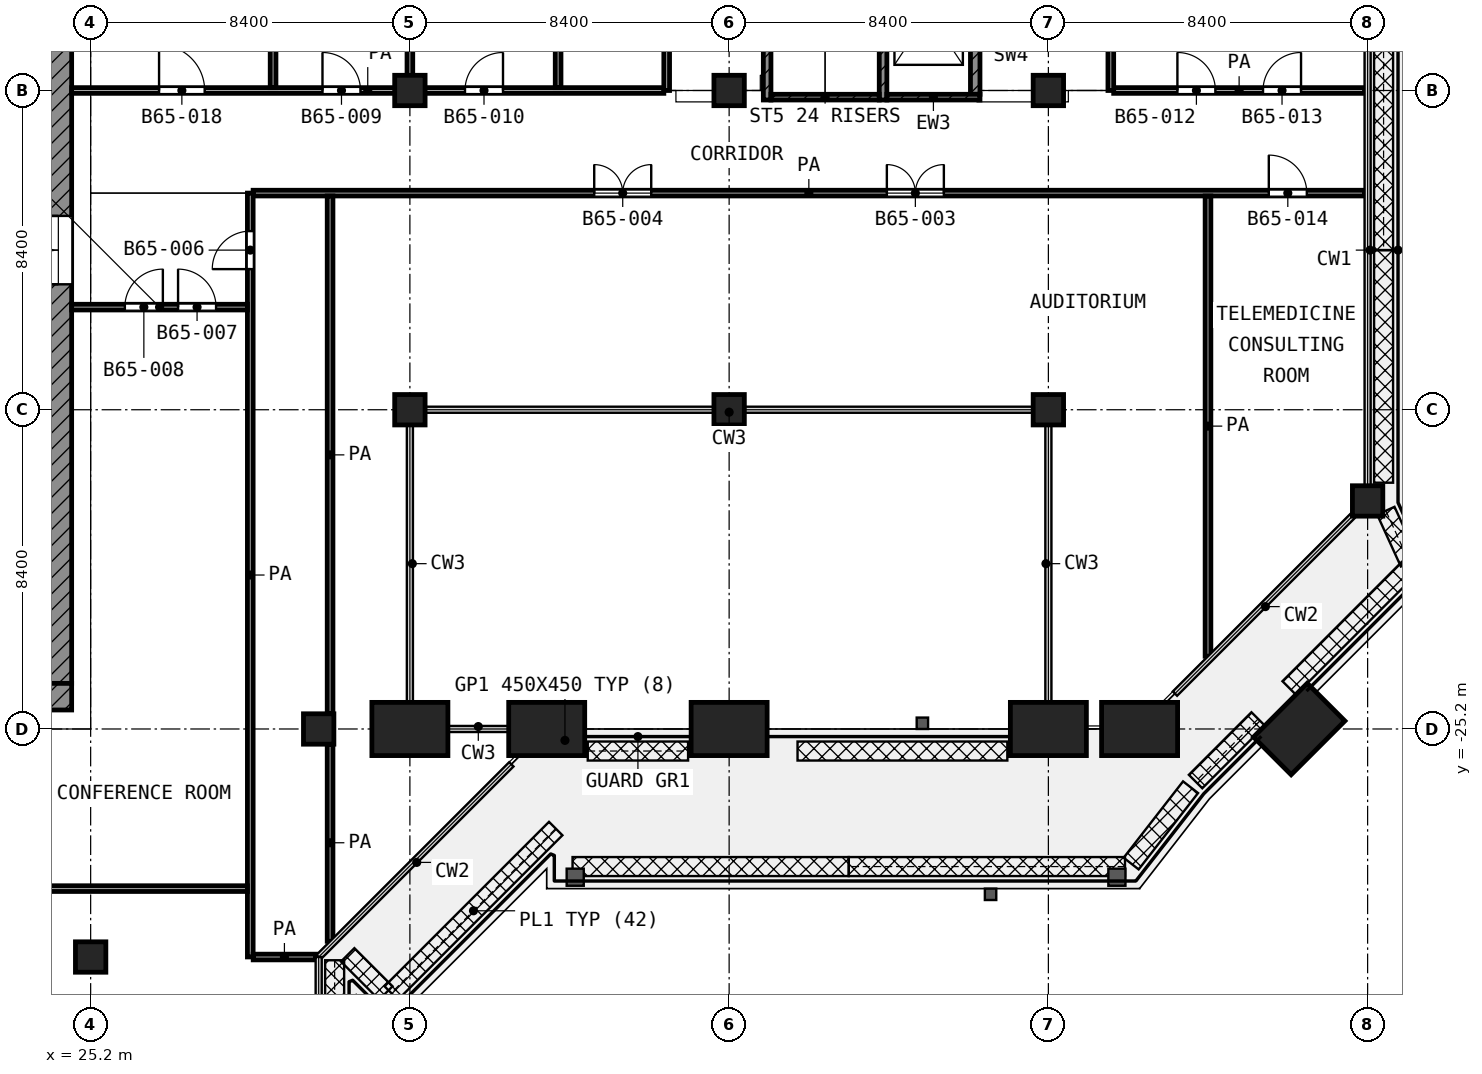
"""IFC4 building model, lengths in metres.
Left out: names, types, materials, properties, quantities, classifications, styles, units other than length and angle.
Written with IfcOpenShell. Run it as: python <this file> out.ifc"""

import sys

from ifc_helpers import new_model, si_unit, direction, frame, frame_2d, origin, origin_2d, place, context, subcontext, project, spatial, rectangle, extrude, element, fill, save


model = new_model("IFC4")
c1 = context("Model", 3, precision=1e-05, world=origin(), true_north=direction((0.0, 1.0)))
c2 = subcontext(c1, "Body", "Model", "MODEL_VIEW")
j1 = project(units=[si_unit("LENGTHUNIT", "METRE"), si_unit("PLANEANGLEUNIT", "RADIAN")], contexts=[c1])
p1 = place(None, origin())
s1 = spatial("IfcSite", under=j1, at=p1, CompositionType="ELEMENT")
p2 = place(p1, origin())
s2 = spatial("IfcBuilding", under=s1, at=p2, CompositionType="ELEMENT")
p3 = place(p2, frame((0.0, 0.0, 281.8)))
s3 = spatial("IfcBuildingStorey", under=s2, at=p3, CompositionType="ELEMENT", Elevation=281.8)
for number, where, z_axis, x_axis in (
    (1, (33.6, -8.4, 0.0), (0.0, 0.0, 1.0), (1.0, 0.0, 0.0)),
    (2, (42.0, -8.4, 0.0), (0.0, 0.0, 1.0), (1.0, 0.0, 0.0)),
    (3, (50.4, -8.4, 0.0), (0.0, 0.0, 1.0), (1.0, 0.0, 0.0)),
    (4, (33.6, -16.8, 0.0), (0.0, 0.0, 1.0), (1.0, 0.0, 0.0)),
    (5, (42.0, -16.8, 0.0), (0.0, 0.0, 1.0), (1.0, 0.0, 0.0)),
    (6, (50.4, -16.8, 0.0), (0.0, 0.0, 1.0), (1.0, 0.0, 0.0)),
    (7, (58.8, -19.2, 0.0), (0.0, 0.0, 1.0), (1.0, 0.0, 0.0)),
    (8, (31.2, -25.2, 0.0), (0.0, 0.0, 1.0), (1.0, 0.0, 0.0)),
):
    element("IfcColumn", number, at=place(p3, frame(where, z_axis=z_axis, x_axis=x_axis)), inside=s3, PredefinedType="COLUMN", context=c2, shape_type="SweptSolid", body=[
        extrude(rectangle(XDim=0.8, YDim=0.8, at=origin_2d()), origin(), (0.0, 0.0, 1.0), 4.2),
    ])
for number, where, z_axis, x_axis in (
    (9, (42.0, -25.2, 0.0), (0.0, 0.0, 1.0), (-1.0, 0.0, 0.0)),
    (10, (52.8, -25.2, 0.0), (0.0, 0.0, 1.0), (-1.0, 0.0, 0.0)),
):
    element("IfcColumn", number, at=place(p3, frame(where, z_axis=z_axis, x_axis=x_axis)), inside=s3, PredefinedType="COLUMN", context=c2, shape_type="SweptSolid", body=[
        extrude(rectangle(XDim=2.0, YDim=1.4, at=origin_2d()), origin(), (0.0, 0.0, 1.0), 4.2),
    ])
p4 = place(p3, frame((25.2, -31.2, 0.0), z_axis=(0.0, 0.0, 1.0), x_axis=(1.0, 0.0, 0.0)))
e11 = element("IfcColumn", 11, at=p4, inside=s3, PredefinedType="COLUMN", context=c2, shape_type="SweptSolid", body=[
    extrude(rectangle(XDim=0.8, YDim=0.8, at=origin_2d()), origin(), (0.0, 0.0, 1.0), 4.2),
])
for number, where, z_axis, x_axis in (
    (12, (50.4, -25.2, 0.0), (0.0, 0.0, 1.0), (-1.0, 0.0, 0.0)),
    (13, (37.2, -25.2, 0.0), (0.0, 0.0, 1.0), (-1.0, 0.0, 0.0)),
    (14, (33.6, -25.2, 0.0), (0.0, 0.0, 1.0), (-1.0, 0.0, 0.0)),
    (15, (57.0, -25.2, 0.0), (0.0, 0.0, 1.0), (-0.707, -0.707, 0.0)),
):
    element("IfcColumn", number, at=place(p3, frame(where, z_axis=z_axis, x_axis=x_axis)), inside=s3, PredefinedType="COLUMN", context=c2, shape_type="SweptSolid", body=[
        extrude(rectangle(XDim=2.0, YDim=1.4, at=origin_2d()), origin(), (0.0, 0.0, 1.0), 4.2),
    ])
p5 = place(p3, frame((24.35, -24.0, 0.0), z_axis=(0.0, 0.0, 1.0), x_axis=(0.0, 1.0, 0.0)))
e16 = element("IfcWall", 16, at=p5, inside=s3, PredefinedType="SHEAR", context=c2, shape_type="SweptSolid", body=[
    extrude(rectangle(XDim=18.6, YDim=0.7, at=frame_2d((9.3, 0.0))), origin(), (0.0, 0.0, 1.0), 3.6),
])
p6 = place(p5, frame((10.5, 0.0, 0.0)))
e17 = element("IfcOpeningElement", 17, at=p6, cuts=e16, PredefinedType="OPENING", context=c2, shape_type="SweptSolid", body=[
    extrude(rectangle(XDim=1.8, YDim=2.1, at=frame_2d((0.9, 1.05))), frame((0.0, 0.36, 0.0), z_axis=(0.0, -1.0, 0.0), x_axis=(1.0, 0.0, 0.0)), (0.0, 0.0, 1.0), 0.72),
])
p7 = place(p3, frame((24.35, -24.7, 0.0), z_axis=(0.0, 0.0, 1.0), x_axis=(0.0, 1.0, 0.0)))
e18 = element("IfcWall", 18, at=p7, inside=s3, PredefinedType="SHEAR", context=c2, shape_type="SweptSolid", body=[
    extrude(rectangle(XDim=0.7, YDim=0.7, at=frame_2d((0.35, 0.0))), origin(), (0.0, 0.0, 1.0), 3.6),
])
p8 = place(p3, frame((43.0, -8.65, 0.0), z_axis=(0.0, 0.0, 1.0), x_axis=(0.0, 1.0, 0.0)))
e19 = element("IfcWall", 19, at=p8, inside=s3, PredefinedType="SHEAR", context=c2, shape_type="SweptSolid", body=[
    extrude(rectangle(XDim=8.35, YDim=0.2, at=frame_2d((4.175, 0.0))), origin(), (0.0, 0.0, 1.0), 3.6),
])
p9 = place(p8, frame((7.0, 0.0, 0.0)))
e20 = element("IfcOpeningElement", 20, at=p9, cuts=e19, PredefinedType="OPENING", context=c2, shape_type="SweptSolid", body=[
    extrude(rectangle(XDim=1.1, YDim=2.1, at=frame_2d((0.55, 1.05))), frame((0.0, 0.11, 0.0), z_axis=(0.0, -1.0, 0.0), x_axis=(1.0, 0.0, 0.0)), (0.0, 0.0, 1.0), 0.22),
])
p10 = place(p3, frame((46.05, -8.65, 0.0), z_axis=(0.0, 0.0, 1.0), x_axis=(0.0, 1.0, 0.0)))
e21 = element("IfcWall", 21, at=p10, inside=s3, PredefinedType="SHEAR", context=c2, shape_type="SweptSolid", body=[
    extrude(rectangle(XDim=8.35, YDim=0.2, at=frame_2d((4.175, 0.0))), origin(), (0.0, 0.0, 1.0), 3.6),
])
p11 = place(p10, frame((7.0, 0.0, 0.0)))
e22 = element("IfcOpeningElement", 22, at=p11, cuts=e21, PredefinedType="OPENING", context=c2, shape_type="SweptSolid", body=[
    extrude(rectangle(XDim=1.1, YDim=2.1, at=frame_2d((0.55, 1.05))), frame((0.0, 0.11, 0.0), z_axis=(0.0, -1.0, 0.0), x_axis=(1.0, 0.0, 0.0)), (0.0, 0.0, 1.0), 0.22),
])
p12 = place(p3, frame((43.1, -8.575, 0.0), z_axis=(0.0, 0.0, 1.0), x_axis=(1.0, 0.0, 0.0)))
e23 = element("IfcWall", 23, at=p12, inside=s3, PredefinedType="SHEAR", context=c2, shape_type="SweptSolid", body=[
    extrude(rectangle(XDim=2.85, YDim=0.15, at=frame_2d((1.425, 0.0))), origin(), (0.0, 0.0, 1.0), 3.6),
])
p13 = place(p3, frame((46.15, -8.575, 0.0), z_axis=(0.0, 0.0, 1.0), x_axis=(1.0, 0.0, 0.0)))
e24 = element("IfcWall", 24, at=p13, inside=s3, PredefinedType="SHEAR", context=c2, shape_type="SweptSolid", body=[
    extrude(rectangle(XDim=2.45, YDim=0.15, at=frame_2d((1.225, 0.0))), origin(), (0.0, 0.0, 1.0), 3.6),
])
p14 = place(p3, frame((48.475, -8.5, 0.0), z_axis=(0.0, 0.0, 1.0), x_axis=(0.0, 1.0, 0.0)))
e25 = element("IfcWall", 25, at=p14, inside=s3, PredefinedType="SHEAR", context=c2, shape_type="SweptSolid", body=[
    extrude(rectangle(XDim=3.475, YDim=0.25, at=frame_2d((1.738, 0.0))), origin(), (0.0, 0.0, 1.0), 3.6),
])
p15 = place(p3, frame((29.477, -31.2, 0.0), z_axis=(0.0, 0.0, 1.0), x_axis=(1.0, 0.0, 0.0)))
e26 = element("IfcWall", 26, at=p15, inside=s3, PredefinedType="PARTITIONING", context=c2, shape_type="SweptSolid", body=[
    extrude(rectangle(XDim=1.643, YDim=0.15, at=frame_2d((0.822, 0.0))), origin(), (0.0, 0.0, 1.0), 3.6),
])
p16 = place(p3, frame((11.175, -29.4, 0.0), z_axis=(0.0, 0.0, 1.0), x_axis=(1.0, 0.0, 0.0)))
e27 = element("IfcWall", 27, at=p16, inside=s3, PredefinedType="PARTITIONING", context=c2, shape_type="SweptSolid", body=[
    extrude(rectangle(XDim=18.15, YDim=0.15, at=frame_2d((9.075, 0.0))), origin(), (0.0, 0.0, 1.0), 3.6),
])
p17 = place(p3, frame((24.7, -14.1, 0.0), z_axis=(0.0, 0.0, 1.0), x_axis=(1.0, 0.0, 0.0)))
e28 = element("IfcWall", 28, at=p17, inside=s3, PredefinedType="PARTITIONING", context=c2, shape_type="SweptSolid", body=[
    extrude(rectangle(XDim=4.625, YDim=0.15, at=frame_2d((2.312, 0.0))), origin(), (0.0, 0.0, 1.0), 3.6),
])
p18 = place(p17, frame((2.8, 0.0, 0.0)))
e29 = element("IfcOpeningElement", 29, at=p18, cuts=e28, PredefinedType="OPENING", context=c2, shape_type="SweptSolid", body=[
    extrude(rectangle(XDim=1.0, YDim=2.1, at=frame_2d((0.5, 1.05))), frame((0.0, 0.085, 0.0), z_axis=(0.0, -1.0, 0.0), x_axis=(1.0, 0.0, 0.0)), (0.0, 0.0, 1.0), 0.17),
])
p19 = place(p17, frame((1.4, 0.0, 0.0)))
e30 = element("IfcOpeningElement", 30, at=p19, cuts=e28, PredefinedType="OPENING", context=c2, shape_type="SweptSolid", body=[
    extrude(rectangle(XDim=1.0, YDim=2.1, at=frame_2d((0.5, 1.05))), frame((0.0, 0.085, 0.0), z_axis=(0.0, -1.0, 0.0), x_axis=(1.0, 0.0, 0.0)), (0.0, 0.0, 1.0), 0.17),
])
p20 = place(p3, frame((29.475, -11.1, 0.0), z_axis=(0.0, 0.0, 1.0), x_axis=(1.0, 0.0, 0.0)))
e31 = element("IfcWall", 31, at=p20, inside=s3, PredefinedType="PARTITIONING", context=c2, shape_type="SweptSolid", body=[
    extrude(rectangle(XDim=29.245, YDim=0.15, at=frame_2d((14.623, 0.0))), origin(), (0.0, 0.0, 1.0), 3.6),
])
p21 = place(p20, frame((26.725, 0.0, 0.0)))
e32 = element("IfcOpeningElement", 32, at=p21, cuts=e31, PredefinedType="OPENING", context=c2, shape_type="SweptSolid", body=[
    extrude(rectangle(XDim=1.0, YDim=2.1, at=frame_2d((0.5, 1.05))), frame((0.0, 0.085, 0.0), z_axis=(0.0, -1.0, 0.0), x_axis=(1.0, 0.0, 0.0)), (0.0, 0.0, 1.0), 0.17),
])
p22 = place(p20, frame((16.675, 0.0, 0.0)))
e33 = element("IfcOpeningElement", 33, at=p22, cuts=e31, PredefinedType="OPENING", context=c2, shape_type="SweptSolid", body=[
    extrude(rectangle(XDim=1.5, YDim=2.1, at=frame_2d((0.75, 1.05))), frame((0.0, 0.085, 0.0), z_axis=(0.0, -1.0, 0.0), x_axis=(1.0, 0.0, 0.0)), (0.0, 0.0, 1.0), 0.17),
])
p23 = place(p20, frame((8.975, 0.0, 0.0)))
e34 = element("IfcOpeningElement", 34, at=p23, cuts=e31, PredefinedType="OPENING", context=c2, shape_type="SweptSolid", body=[
    extrude(rectangle(XDim=1.5, YDim=2.1, at=frame_2d((0.75, 1.05))), frame((0.0, 0.085, 0.0), z_axis=(0.0, -1.0, 0.0), x_axis=(1.0, 0.0, 0.0)), (0.0, 0.0, 1.0), 0.17),
])
p24 = place(p3, frame((24.7, -8.4, 0.0), z_axis=(0.0, 0.0, 1.0), x_axis=(1.0, 0.0, 0.0)))
e35 = element("IfcWall", 35, at=p24, inside=s3, PredefinedType="PARTITIONING", context=c2, shape_type="SweptSolid", body=[
    extrude(rectangle(XDim=15.582, YDim=0.15, at=frame_2d((7.791, 0.0))), origin(), (0.0, 0.0, 1.0), 3.6),
])
p25 = place(p24, frame((2.3, 0.0, 0.0)))
e36 = element("IfcOpeningElement", 36, at=p25, cuts=e35, PredefinedType="OPENING", context=c2, shape_type="SweptSolid", body=[
    extrude(rectangle(XDim=1.2, YDim=2.1, at=frame_2d((0.6, 1.05))), frame((0.0, 0.085, 0.0), z_axis=(0.0, -1.0, 0.0), x_axis=(1.0, 0.0, 0.0)), (0.0, 0.0, 1.0), 0.17),
])
p26 = place(p24, frame((6.6, 0.0, 0.0)))
e37 = element("IfcOpeningElement", 37, at=p26, cuts=e35, PredefinedType="OPENING", context=c2, shape_type="SweptSolid", body=[
    extrude(rectangle(XDim=1.0, YDim=2.1, at=frame_2d((0.5, 1.05))), frame((0.0, 0.085, 0.0), z_axis=(0.0, -1.0, 0.0), x_axis=(1.0, 0.0, 0.0)), (0.0, 0.0, 1.0), 0.17),
])
p27 = place(p24, frame((10.35, 0.0, 0.0)))
e38 = element("IfcOpeningElement", 38, at=p27, cuts=e35, PredefinedType="OPENING", context=c2, shape_type="SweptSolid", body=[
    extrude(rectangle(XDim=1.0, YDim=2.1, at=frame_2d((0.5, 1.05))), frame((0.0, 0.085, 0.0), z_axis=(0.0, -1.0, 0.0), x_axis=(1.0, 0.0, 0.0)), (0.0, 0.0, 1.0), 0.17),
])
p28 = place(p3, frame((52.118, -8.4, 0.0), z_axis=(0.0, 0.0, 1.0), x_axis=(1.0, 0.0, 0.0)))
e39 = element("IfcWall", 39, at=p28, inside=s3, PredefinedType="PARTITIONING", context=c2, shape_type="SweptSolid", body=[
    extrude(rectangle(XDim=6.602, YDim=0.15, at=frame_2d((3.301, 0.0))), origin(), (0.0, 0.0, 1.0), 3.6),
])
p29 = place(p28, frame((1.677, 0.0, 0.0)))
e40 = element("IfcOpeningElement", 40, at=p29, cuts=e39, PredefinedType="OPENING", context=c2, shape_type="SweptSolid", body=[
    extrude(rectangle(XDim=1.0, YDim=2.1, at=frame_2d((0.5, 1.05))), frame((0.0, 0.085, 0.0), z_axis=(0.0, -1.0, 0.0), x_axis=(1.0, 0.0, 0.0)), (0.0, 0.0, 1.0), 0.17),
])
p30 = place(p28, frame((3.93, 0.0, 0.0)))
e41 = element("IfcOpeningElement", 41, at=p30, cuts=e39, PredefinedType="OPENING", context=c2, shape_type="SweptSolid", body=[
    extrude(rectangle(XDim=1.0, YDim=2.1, at=frame_2d((0.5, 1.05))), frame((0.0, 0.085, 0.0), z_axis=(0.0, -1.0, 0.0), x_axis=(1.0, 0.0, 0.0)), (0.0, 0.0, 1.0), 0.17),
])
p31 = place(p3, frame((29.4, -31.198, 0.0), z_axis=(0.0, 0.0, 1.0), x_axis=(0.0, 1.0, 0.0)))
e42 = element("IfcWall", 42, at=p31, inside=s3, PredefinedType="PARTITIONING", context=c2, shape_type="SweptSolid", body=[
    extrude(rectangle(XDim=20.098, YDim=0.15, at=frame_2d((10.049, 0.0))), origin(), (0.0, 0.0, 1.0), 3.6),
])
p32 = place(p31, frame((18.098, 0.0, 0.0)))
e43 = element("IfcOpeningElement", 43, at=p32, cuts=e42, PredefinedType="OPENING", context=c2, shape_type="SweptSolid", body=[
    extrude(rectangle(XDim=1.0, YDim=2.1, at=frame_2d((0.5, 1.05))), frame((0.0, 0.085, 0.0), z_axis=(0.0, -1.0, 0.0), x_axis=(1.0, 0.0, 0.0)), (0.0, 0.0, 1.0), 0.17),
])
p33 = place(p3, frame((30.0, -8.325, 0.0), z_axis=(0.0, 0.0, 1.0), x_axis=(0.0, 1.0, 0.0)))
e44 = element("IfcWall", 44, at=p33, inside=s3, PredefinedType="PARTITIONING", context=c2, shape_type="SweptSolid", body=[
    extrude(rectangle(XDim=8.245, YDim=0.15, at=frame_2d((4.123, 0.0))), origin(), (0.0, 0.0, 1.0), 3.6),
])
p34 = place(p3, frame((31.5, -30.787, 0.0), z_axis=(0.0, 0.0, 1.0), x_axis=(0.0, 1.0, 0.0)))
e45 = element("IfcWall", 45, at=p34, inside=s3, PredefinedType="PARTITIONING", context=c2, shape_type="SweptSolid", body=[
    extrude(rectangle(XDim=5.187, YDim=0.15, at=frame_2d((2.594, 0.0))), origin(), (0.0, 0.0, 1.0), 3.6),
])
p35 = place(p3, frame((31.5, -24.8, 0.0), z_axis=(0.0, 0.0, 1.0), x_axis=(0.0, 1.0, 0.0)))
e46 = element("IfcWall", 46, at=p35, inside=s3, PredefinedType="PARTITIONING", context=c2, shape_type="SweptSolid", body=[
    extrude(rectangle(XDim=13.625, YDim=0.15, at=frame_2d((6.812, 0.0))), origin(), (0.0, 0.0, 1.0), 3.6),
])
for number, where, z_axis, x_axis in (
    (47, (33.6, -8.325, 0.0), (0.0, 0.0, 1.0), (0.0, 1.0, 0.0)),
    (48, (37.5, -8.325, 0.0), (0.0, 0.0, 1.0), (0.0, 1.0, 0.0)),
):
    element("IfcWall", number, at=place(p3, frame(where, z_axis=z_axis, x_axis=x_axis)), inside=s3, PredefinedType="PARTITIONING", context=c2, shape_type="SweptSolid", body=[
        extrude(rectangle(XDim=8.245, YDim=0.15, at=frame_2d((4.123, 0.0))), origin(), (0.0, 0.0, 1.0), 3.6),
    ])
p36 = place(p3, frame((40.357, -8.4, 0.0), z_axis=(0.0, 0.0, 1.0), x_axis=(0.0, 1.0, 0.0)))
e49 = element("IfcWall", 49, at=p36, inside=s3, PredefinedType="PARTITIONING", context=c2, shape_type="SweptSolid", body=[
    extrude(rectangle(XDim=8.32, YDim=0.15, at=frame_2d((4.16, 0.0))), origin(), (0.0, 0.0, 1.0), 3.6),
])
p37 = place(p36, frame((3.7, 0.0, 0.0)))
e50 = element("IfcOpeningElement", 50, at=p37, cuts=e49, PredefinedType="OPENING", context=c2, shape_type="SweptSolid", body=[
    extrude(rectangle(XDim=1.0, YDim=2.1, at=frame_2d((0.5, 1.05))), frame((0.0, 0.085, 0.0), z_axis=(0.0, -1.0, 0.0), x_axis=(1.0, 0.0, 0.0)), (0.0, 0.0, 1.0), 0.17),
])
p38 = place(p3, frame((52.043, -8.4, 0.0), z_axis=(0.0, 0.0, 1.0), x_axis=(0.0, 1.0, 0.0)))
e51 = element("IfcWall", 51, at=p38, inside=s3, PredefinedType="PARTITIONING", context=c2, shape_type="SweptSolid", body=[
    extrude(rectangle(XDim=6.548, YDim=0.15, at=frame_2d((3.274, 0.0))), origin(), (0.0, 0.0, 1.0), 3.6),
])
p39 = place(p3, frame((54.6, -23.287, 0.0), z_axis=(0.0, 0.0, 1.0), x_axis=(0.0, 1.0, 0.0)))
e52 = element("IfcWall", 52, at=p39, inside=s3, PredefinedType="PARTITIONING", context=c2, shape_type="SweptSolid", body=[
    extrude(rectangle(XDim=12.112, YDim=0.15, at=frame_2d((6.056, 0.0))), origin(), (0.0, 0.0, 1.0), 3.6),
])
p40 = place(p6, origin())
e53 = element("IfcDoor", 53, at=p40, inside=s3, OperationType="DOUBLE_DOOR_SINGLE_SWING", PredefinedType="DOOR", context=c2, shape_type="SweptSolid", body=[
    extrude(rectangle(XDim=1.8, YDim=2.1, at=frame_2d((0.9, 1.05))), frame((0.0, 0.025, 0.0), z_axis=(0.0, -1.0, 0.0), x_axis=(1.0, 0.0, 0.0)), (0.0, 0.0, 1.0), 0.05),
])
fill(e17, e53)
p41 = place(p18, origin())
e54 = element("IfcDoor", 54, at=p41, inside=s3, OperationType="SINGLE_SWING_LEFT", PredefinedType="DOOR", context=c2, shape_type="SweptSolid", body=[
    extrude(rectangle(XDim=1.0, YDim=2.1, at=frame_2d((0.5, 1.05))), frame((0.0, 0.025, 0.0), z_axis=(0.0, -1.0, 0.0), x_axis=(1.0, 0.0, 0.0)), (0.0, 0.0, 1.0), 0.05),
])
fill(e29, e54)
p42 = place(p19, origin())
e55 = element("IfcDoor", 55, at=p42, inside=s3, OperationType="SINGLE_SWING_RIGHT", PredefinedType="DOOR", context=c2, shape_type="SweptSolid", body=[
    extrude(rectangle(XDim=1.0, YDim=2.1, at=frame_2d((0.5, 1.05))), frame((0.0, 0.025, 0.0), z_axis=(0.0, -1.0, 0.0), x_axis=(1.0, 0.0, 0.0)), (0.0, 0.0, 1.0), 0.05),
])
fill(e30, e55)
p43 = place(p25, origin())
e56 = element("IfcDoor", 56, at=p43, inside=s3, OperationType="SINGLE_SWING_LEFT", PredefinedType="DOOR", context=c2, shape_type="SweptSolid", body=[
    extrude(rectangle(XDim=1.2, YDim=2.1, at=frame_2d((0.6, 1.05))), frame((0.0, 0.025, 0.0), z_axis=(0.0, -1.0, 0.0), x_axis=(1.0, 0.0, 0.0)), (0.0, 0.0, 1.0), 0.05),
])
fill(e36, e56)
p44 = place(p26, origin())
e57 = element("IfcDoor", 57, at=p44, inside=s3, OperationType="SINGLE_SWING_LEFT", PredefinedType="DOOR", context=c2, shape_type="SweptSolid", body=[
    extrude(rectangle(XDim=1.0, YDim=2.1, at=frame_2d((0.5, 1.05))), frame((0.0, 0.025, 0.0), z_axis=(0.0, -1.0, 0.0), x_axis=(1.0, 0.0, 0.0)), (0.0, 0.0, 1.0), 0.05),
])
fill(e37, e57)
p45 = place(p27, origin())
e58 = element("IfcDoor", 58, at=p45, inside=s3, OperationType="SINGLE_SWING_RIGHT", PredefinedType="DOOR", context=c2, shape_type="SweptSolid", body=[
    extrude(rectangle(XDim=1.0, YDim=2.1, at=frame_2d((0.5, 1.05))), frame((0.0, 0.025, 0.0), z_axis=(0.0, -1.0, 0.0), x_axis=(1.0, 0.0, 0.0)), (0.0, 0.0, 1.0), 0.05),
])
fill(e38, e58)
p46 = place(p29, origin())
e59 = element("IfcDoor", 59, at=p46, inside=s3, OperationType="SINGLE_SWING_LEFT", PredefinedType="DOOR", context=c2, shape_type="SweptSolid", body=[
    extrude(rectangle(XDim=1.0, YDim=2.1, at=frame_2d((0.5, 1.05))), frame((0.0, 0.025, 0.0), z_axis=(0.0, -1.0, 0.0), x_axis=(1.0, 0.0, 0.0)), (0.0, 0.0, 1.0), 0.05),
])
fill(e40, e59)
p47 = place(p30, origin())
e60 = element("IfcDoor", 60, at=p47, inside=s3, OperationType="SINGLE_SWING_RIGHT", PredefinedType="DOOR", context=c2, shape_type="SweptSolid", body=[
    extrude(rectangle(XDim=1.0, YDim=2.1, at=frame_2d((0.5, 1.05))), frame((0.0, 0.025, 0.0), z_axis=(0.0, -1.0, 0.0), x_axis=(1.0, 0.0, 0.0)), (0.0, 0.0, 1.0), 0.05),
])
fill(e41, e60)
p48 = place(p21, origin())
e61 = element("IfcDoor", 61, at=p48, inside=s3, OperationType="SINGLE_SWING_LEFT", PredefinedType="DOOR", context=c2, shape_type="SweptSolid", body=[
    extrude(rectangle(XDim=1.0, YDim=2.1, at=frame_2d((0.5, 1.05))), frame((0.0, 0.025, 0.0), z_axis=(0.0, -1.0, 0.0), x_axis=(1.0, 0.0, 0.0)), (0.0, 0.0, 1.0), 0.05),
])
fill(e32, e61)
p49 = place(p32, origin())
e62 = element("IfcDoor", 62, at=p49, inside=s3, OperationType="SINGLE_SWING_LEFT", PredefinedType="DOOR", context=c2, shape_type="SweptSolid", body=[
    extrude(rectangle(XDim=1.0, YDim=2.1, at=frame_2d((0.5, 1.05))), frame((0.0, 0.025, 0.0), z_axis=(0.0, -1.0, 0.0), x_axis=(1.0, 0.0, 0.0)), (0.0, 0.0, 1.0), 0.05),
])
fill(e43, e62)
p50 = place(p22, origin())
e63 = element("IfcDoor", 63, at=p50, inside=s3, OperationType="DOUBLE_DOOR_SINGLE_SWING", PredefinedType="DOOR", context=c2, shape_type="SweptSolid", body=[
    extrude(rectangle(XDim=1.5, YDim=2.1, at=frame_2d((0.75, 1.05))), frame((0.0, 0.025, 0.0), z_axis=(0.0, -1.0, 0.0), x_axis=(1.0, 0.0, 0.0)), (0.0, 0.0, 1.0), 0.05),
])
fill(e33, e63)
p51 = place(p23, origin())
e64 = element("IfcDoor", 64, at=p51, inside=s3, OperationType="DOUBLE_DOOR_SINGLE_SWING", PredefinedType="DOOR", context=c2, shape_type="SweptSolid", body=[
    extrude(rectangle(XDim=1.5, YDim=2.1, at=frame_2d((0.75, 1.05))), frame((0.0, 0.025, 0.0), z_axis=(0.0, -1.0, 0.0), x_axis=(1.0, 0.0, 0.0)), (0.0, 0.0, 1.0), 0.05),
])
fill(e34, e64)
save(model, sys.argv[1])
